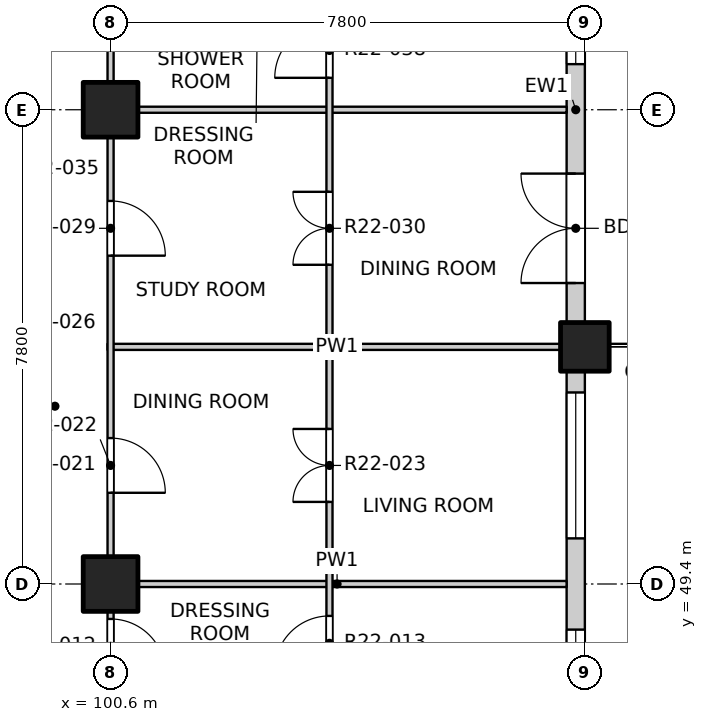
"""IFC4 building model, lengths in metres.
Left out: names, types, materials, properties, quantities, classifications, styles, units other than length and angle.
Written with IfcOpenShell. Run it as: python <this file> out.ifc"""

import sys

from ifc_helpers import new_model, si_unit, direction, frame, frame_2d, origin, origin_2d, place, context, subcontext, project, spatial, rectangle, extrude, element, fill, save


model = new_model("IFC4")
c1 = context("Model", 3, precision=1e-05, world=origin(), true_north=direction((0.0, 1.0)))
c2 = subcontext(c1, "Body", "Model", "MODEL_VIEW")
j1 = project(units=[si_unit("LENGTHUNIT", "METRE"), si_unit("PLANEANGLEUNIT", "RADIAN")], contexts=[c1])
p1 = place(None, origin())
s1 = spatial("IfcSite", under=j1, at=p1, CompositionType="ELEMENT")
p2 = place(p1, origin())
s2 = spatial("IfcBuilding", under=s1, at=p2, CompositionType="ELEMENT")
p3 = place(p2, frame((0.0, 0.0, 224.5)))
s3 = spatial("IfcBuildingStorey", under=s2, at=p3, CompositionType="ELEMENT", Elevation=224.5)
p4 = place(p3, frame((108.4, 53.3, -0.25), z_axis=(0.0, 0.0, 1.0), x_axis=(1.0, 0.0, 0.0)))
e1 = element("IfcColumn", 1, at=p4, inside=s3, PredefinedType="COLUMN", context=c2, shape_type="SweptSolid", body=[
    extrude(rectangle(XDim=0.8, YDim=0.8, at=origin_2d()), origin(), (0.0, 0.0, 1.0), 3.4),
])
for number, where, z_axis, x_axis in (
    (2, (100.6, 49.4, -0.25), (0.0, 0.0, 1.0), (1.0, 0.0, 0.0)),
    (3, (100.6, 57.2, -0.25), (0.0, 0.0, 1.0), (1.0, 0.0, 0.0)),
):
    element("IfcColumn", number, at=place(p3, frame(where, z_axis=z_axis, x_axis=x_axis)), inside=s3, PredefinedType="COLUMN", context=c2, shape_type="SweptSolid", body=[
        extrude(rectangle(XDim=0.9, YDim=0.9, at=origin_2d()), origin(), (0.0, 0.0, 1.0), 3.4),
    ])
p5 = place(p3, frame((108.25, 45.5, 0.0), z_axis=(0.0, 0.0, 1.0), x_axis=(0.0, 1.0, 0.0)))
e4 = element("IfcWall", 4, at=p5, inside=s3, PredefinedType="SOLIDWALL", context=c2, shape_type="SweptSolid", body=[
    extrude(rectangle(XDim=7.4, YDim=0.3, at=frame_2d((3.7, 0.0))), origin(), (0.0, 0.0, 1.0), 2.7),
])
p6 = place(p5, frame((0.75, 0.0, 0.9)))
e5 = element("IfcOpeningElement", 5, at=p6, cuts=e4, PredefinedType="OPENING", context=c2, shape_type="SweptSolid", body=[
    extrude(rectangle(XDim=2.4, YDim=1.8, at=frame_2d((1.2, 0.9))), frame((0.0, 0.16, 0.0), z_axis=(0.0, -1.0, 0.0), x_axis=(1.0, 0.0, 0.0)), (0.0, 0.0, 1.0), 0.32),
])
p7 = place(p5, frame((4.65, 0.0, 0.9)))
e6 = element("IfcOpeningElement", 6, at=p7, cuts=e4, PredefinedType="OPENING", context=c2, shape_type="SweptSolid", body=[
    extrude(rectangle(XDim=2.4, YDim=1.8, at=frame_2d((1.2, 0.9))), frame((0.0, 0.16, 0.0), z_axis=(0.0, -1.0, 0.0), x_axis=(1.0, 0.0, 0.0)), (0.0, 0.0, 1.0), 0.32),
])
p8 = place(p3, frame((108.25, 53.7, 0.0), z_axis=(0.0, 0.0, 1.0), x_axis=(0.0, 1.0, 0.0)))
e7 = element("IfcWall", 7, at=p8, inside=s3, PredefinedType="SOLIDWALL", context=c2, shape_type="SweptSolid", body=[
    extrude(rectangle(XDim=7.0, YDim=0.3, at=frame_2d((3.5, 0.0))), origin(), (0.0, 0.0, 1.0), 2.7),
])
p9 = place(p8, frame((0.65, 0.0, 0.0)))
e8 = element("IfcOpeningElement", 8, at=p9, cuts=e7, PredefinedType="OPENING", context=c2, shape_type="SweptSolid", body=[
    extrude(rectangle(XDim=1.8, YDim=2.4, at=frame_2d((0.9, 1.2))), frame((0.0, 0.16, 0.0), z_axis=(0.0, -1.0, 0.0), x_axis=(1.0, 0.0, 0.0)), (0.0, 0.0, 1.0), 0.32),
])
p10 = place(p8, frame((4.25, 0.0, 0.9)))
e9 = element("IfcOpeningElement", 9, at=p10, cuts=e7, PredefinedType="OPENING", context=c2, shape_type="SweptSolid", body=[
    extrude(rectangle(XDim=2.4, YDim=1.8, at=frame_2d((1.2, 0.9))), frame((0.0, 0.16, 0.0), z_axis=(0.0, -1.0, 0.0), x_axis=(1.0, 0.0, 0.0)), (0.0, 0.0, 1.0), 0.32),
])
for number, where, z_axis, x_axis in (
    (10, (100.55, 49.4, 0.0), (0.0, 0.0, 1.0), (1.0, 0.0, 0.0)),
    (11, (100.55, 53.3, 0.0), (0.0, 0.0, 1.0), (1.0, 0.0, 0.0)),
    (12, (100.55, 57.2, 0.0), (0.0, 0.0, 1.0), (1.0, 0.0, 0.0)),
):
    element("IfcWall", number, at=place(p3, frame(where, z_axis=z_axis, x_axis=x_axis)), inside=s3, PredefinedType="PARTITIONING", context=c2, shape_type="SweptSolid", body=[
        extrude(rectangle(XDim=7.55, YDim=0.1, at=frame_2d((3.775, 0.0))), origin(), (0.0, 0.0, 1.0), 3.15),
    ])
p11 = place(p3, frame((100.6, 41.9, 0.0), z_axis=(0.0, 0.0, 1.0), x_axis=(0.0, 1.0, 0.0)))
e13 = element("IfcWall", 13, at=p11, inside=s3, PredefinedType="PARTITIONING", context=c2, shape_type="SweptSolid", body=[
    extrude(rectangle(XDim=46.2, YDim=0.1, at=frame_2d((23.1, 0.0))), origin(), (0.0, 0.0, 1.0), 3.15),
])
p12 = place(p11, frame((1.2, 0.0, 0.0)))
e14 = element("IfcOpeningElement", 14, at=p12, cuts=e13, PredefinedType="OPENING", context=c2, shape_type="SweptSolid", body=[
    extrude(rectangle(XDim=0.9, YDim=2.1, at=frame_2d((0.45, 1.05))), frame((0.0, 0.06, 0.0), z_axis=(0.0, -1.0, 0.0), x_axis=(1.0, 0.0, 0.0)), (0.0, 0.0, 1.0), 0.12),
])
p13 = place(p11, frame((6.025, 0.0, 0.0)))
e15 = element("IfcOpeningElement", 15, at=p13, cuts=e13, PredefinedType="OPENING", context=c2, shape_type="SweptSolid", body=[
    extrude(rectangle(XDim=0.9, YDim=2.1, at=frame_2d((0.45, 1.05))), frame((0.0, 0.06, 0.0), z_axis=(0.0, -1.0, 0.0), x_axis=(1.0, 0.0, 0.0)), (0.0, 0.0, 1.0), 0.12),
])
p14 = place(p11, frame((9.0, 0.0, 0.0)))
e16 = element("IfcOpeningElement", 16, at=p14, cuts=e13, PredefinedType="OPENING", context=c2, shape_type="SweptSolid", body=[
    extrude(rectangle(XDim=0.9, YDim=2.1, at=frame_2d((0.45, 1.05))), frame((0.0, 0.06, 0.0), z_axis=(0.0, -1.0, 0.0), x_axis=(1.0, 0.0, 0.0)), (0.0, 0.0, 1.0), 0.12),
])
p15 = place(p11, frame((12.9, 0.0, 0.0)))
e17 = element("IfcOpeningElement", 17, at=p15, cuts=e13, PredefinedType="OPENING", context=c2, shape_type="SweptSolid", body=[
    extrude(rectangle(XDim=0.9, YDim=2.1, at=frame_2d((0.45, 1.05))), frame((0.0, 0.06, 0.0), z_axis=(0.0, -1.0, 0.0), x_axis=(1.0, 0.0, 0.0)), (0.0, 0.0, 1.0), 0.12),
])
p16 = place(p11, frame((17.775, 0.0, 0.0)))
e18 = element("IfcOpeningElement", 18, at=p16, cuts=e13, PredefinedType="OPENING", context=c2, shape_type="SweptSolid", body=[
    extrude(rectangle(XDim=0.9, YDim=2.1, at=frame_2d((0.45, 1.05))), frame((0.0, 0.06, 0.0), z_axis=(0.0, -1.0, 0.0), x_axis=(1.0, 0.0, 0.0)), (0.0, 0.0, 1.0), 0.12),
])
p17 = place(p11, frame((21.625, 0.0, 0.0)))
e19 = element("IfcOpeningElement", 19, at=p17, cuts=e13, PredefinedType="OPENING", context=c2, shape_type="SweptSolid", body=[
    extrude(rectangle(XDim=0.9, YDim=2.1, at=frame_2d((0.45, 1.05))), frame((0.0, 0.06, 0.0), z_axis=(0.0, -1.0, 0.0), x_axis=(1.0, 0.0, 0.0)), (0.0, 0.0, 1.0), 0.12),
])
p18 = place(p11, frame((25.575, 0.0, 0.0)))
e20 = element("IfcOpeningElement", 20, at=p18, cuts=e13, PredefinedType="OPENING", context=c2, shape_type="SweptSolid", body=[
    extrude(rectangle(XDim=0.9, YDim=2.1, at=frame_2d((0.45, 1.05))), frame((0.0, 0.06, 0.0), z_axis=(0.0, -1.0, 0.0), x_axis=(1.0, 0.0, 0.0)), (0.0, 0.0, 1.0), 0.12),
])
p19 = place(p11, frame((28.5, 0.0, 0.0)))
e21 = element("IfcOpeningElement", 21, at=p19, cuts=e13, PredefinedType="OPENING", context=c2, shape_type="SweptSolid", body=[
    extrude(rectangle(XDim=0.9, YDim=2.1, at=frame_2d((0.45, 1.05))), frame((0.0, 0.06, 0.0), z_axis=(0.0, -1.0, 0.0), x_axis=(1.0, 0.0, 0.0)), (0.0, 0.0, 1.0), 0.12),
])
p20 = place(p11, frame((33.375, 0.0, 0.0)))
e22 = element("IfcOpeningElement", 22, at=p20, cuts=e13, PredefinedType="OPENING", context=c2, shape_type="SweptSolid", body=[
    extrude(rectangle(XDim=0.9, YDim=2.1, at=frame_2d((0.45, 1.05))), frame((0.0, 0.06, 0.0), z_axis=(0.0, -1.0, 0.0), x_axis=(1.0, 0.0, 0.0)), (0.0, 0.0, 1.0), 0.12),
])
p21 = place(p11, frame((36.3, 0.0, 0.0)))
e23 = element("IfcOpeningElement", 23, at=p21, cuts=e13, PredefinedType="OPENING", context=c2, shape_type="SweptSolid", body=[
    extrude(rectangle(XDim=0.9, YDim=2.1, at=frame_2d((0.45, 1.05))), frame((0.0, 0.06, 0.0), z_axis=(0.0, -1.0, 0.0), x_axis=(1.0, 0.0, 0.0)), (0.0, 0.0, 1.0), 0.12),
])
p22 = place(p11, frame((40.2, 0.0, 0.0)))
e24 = element("IfcOpeningElement", 24, at=p22, cuts=e13, PredefinedType="OPENING", context=c2, shape_type="SweptSolid", body=[
    extrude(rectangle(XDim=0.9, YDim=2.1, at=frame_2d((0.45, 1.05))), frame((0.0, 0.06, 0.0), z_axis=(0.0, -1.0, 0.0), x_axis=(1.0, 0.0, 0.0)), (0.0, 0.0, 1.0), 0.12),
])
p23 = place(p11, frame((44.1, 0.0, 0.0)))
e25 = element("IfcOpeningElement", 25, at=p23, cuts=e13, PredefinedType="OPENING", context=c2, shape_type="SweptSolid", body=[
    extrude(rectangle(XDim=0.9, YDim=2.1, at=frame_2d((0.45, 1.05))), frame((0.0, 0.06, 0.0), z_axis=(0.0, -1.0, 0.0), x_axis=(1.0, 0.0, 0.0)), (0.0, 0.0, 1.0), 0.12),
])
p24 = place(p3, frame((104.2, 41.9, 0.0), z_axis=(0.0, 0.0, 1.0), x_axis=(0.0, 1.0, 0.0)))
e26 = element("IfcWall", 26, at=p24, inside=s3, PredefinedType="PARTITIONING", context=c2, shape_type="SweptSolid", body=[
    extrude(rectangle(XDim=34.7, YDim=0.1, at=frame_2d((17.35, 0.0))), origin(), (0.0, 0.0, 1.0), 3.15),
])
p25 = place(p24, frame((1.05, 0.0, 0.0)))
e27 = element("IfcOpeningElement", 27, at=p25, cuts=e26, PredefinedType="OPENING", context=c2, shape_type="SweptSolid", body=[
    extrude(rectangle(XDim=1.2, YDim=2.1, at=frame_2d((0.6, 1.05))), frame((0.0, 0.06, 0.0), z_axis=(0.0, -1.0, 0.0), x_axis=(1.0, 0.0, 0.0)), (0.0, 0.0, 1.0), 0.12),
])
p26 = place(p24, frame((4.125, 0.0, 0.0)))
e28 = element("IfcOpeningElement", 28, at=p26, cuts=e26, PredefinedType="OPENING", context=c2, shape_type="SweptSolid", body=[
    extrude(rectangle(XDim=0.9, YDim=2.1, at=frame_2d((0.45, 1.05))), frame((0.0, 0.06, 0.0), z_axis=(0.0, -1.0, 0.0), x_axis=(1.0, 0.0, 0.0)), (0.0, 0.0, 1.0), 0.12),
])
p27 = place(p24, frame((6.075, 0.0, 0.0)))
e29 = element("IfcOpeningElement", 29, at=p27, cuts=e26, PredefinedType="OPENING", context=c2, shape_type="SweptSolid", body=[
    extrude(rectangle(XDim=0.9, YDim=2.1, at=frame_2d((0.45, 1.05))), frame((0.0, 0.06, 0.0), z_axis=(0.0, -1.0, 0.0), x_axis=(1.0, 0.0, 0.0)), (0.0, 0.0, 1.0), 0.12),
])
p28 = place(p24, frame((8.85, 0.0, 0.0)))
e30 = element("IfcOpeningElement", 30, at=p28, cuts=e26, PredefinedType="OPENING", context=c2, shape_type="SweptSolid", body=[
    extrude(rectangle(XDim=1.2, YDim=2.1, at=frame_2d((0.6, 1.05))), frame((0.0, 0.06, 0.0), z_axis=(0.0, -1.0, 0.0), x_axis=(1.0, 0.0, 0.0)), (0.0, 0.0, 1.0), 0.12),
])
p29 = place(p24, frame((12.75, 0.0, 0.0)))
e31 = element("IfcOpeningElement", 31, at=p29, cuts=e26, PredefinedType="OPENING", context=c2, shape_type="SweptSolid", body=[
    extrude(rectangle(XDim=1.2, YDim=2.1, at=frame_2d((0.6, 1.05))), frame((0.0, 0.06, 0.0), z_axis=(0.0, -1.0, 0.0), x_axis=(1.0, 0.0, 0.0)), (0.0, 0.0, 1.0), 0.12),
])
p30 = place(p24, frame((15.825, 0.0, 0.0)))
e32 = element("IfcOpeningElement", 32, at=p30, cuts=e26, PredefinedType="OPENING", context=c2, shape_type="SweptSolid", body=[
    extrude(rectangle(XDim=0.9, YDim=2.1, at=frame_2d((0.45, 1.05))), frame((0.0, 0.06, 0.0), z_axis=(0.0, -1.0, 0.0), x_axis=(1.0, 0.0, 0.0)), (0.0, 0.0, 1.0), 0.12),
])
p31 = place(p24, frame((17.775, 0.0, 0.0)))
e33 = element("IfcOpeningElement", 33, at=p31, cuts=e26, PredefinedType="OPENING", context=c2, shape_type="SweptSolid", body=[
    extrude(rectangle(XDim=0.9, YDim=2.1, at=frame_2d((0.45, 1.05))), frame((0.0, 0.06, 0.0), z_axis=(0.0, -1.0, 0.0), x_axis=(1.0, 0.0, 0.0)), (0.0, 0.0, 1.0), 0.12),
])
p32 = place(p24, frame((19.725, 0.0, 0.0)))
e34 = element("IfcOpeningElement", 34, at=p32, cuts=e26, PredefinedType="OPENING", context=c2, shape_type="SweptSolid", body=[
    extrude(rectangle(XDim=0.9, YDim=2.1, at=frame_2d((0.45, 1.05))), frame((0.0, 0.06, 0.0), z_axis=(0.0, -1.0, 0.0), x_axis=(1.0, 0.0, 0.0)), (0.0, 0.0, 1.0), 0.12),
])
p33 = place(p24, frame((21.675, 0.0, 0.0)))
e35 = element("IfcOpeningElement", 35, at=p33, cuts=e26, PredefinedType="OPENING", context=c2, shape_type="SweptSolid", body=[
    extrude(rectangle(XDim=0.9, YDim=2.1, at=frame_2d((0.45, 1.05))), frame((0.0, 0.06, 0.0), z_axis=(0.0, -1.0, 0.0), x_axis=(1.0, 0.0, 0.0)), (0.0, 0.0, 1.0), 0.12),
])
p34 = place(p24, frame((23.625, 0.0, 0.0)))
e36 = element("IfcOpeningElement", 36, at=p34, cuts=e26, PredefinedType="OPENING", context=c2, shape_type="SweptSolid", body=[
    extrude(rectangle(XDim=0.9, YDim=2.1, at=frame_2d((0.45, 1.05))), frame((0.0, 0.06, 0.0), z_axis=(0.0, -1.0, 0.0), x_axis=(1.0, 0.0, 0.0)), (0.0, 0.0, 1.0), 0.12),
])
p35 = place(p24, frame((25.575, 0.0, 0.0)))
e37 = element("IfcOpeningElement", 37, at=p35, cuts=e26, PredefinedType="OPENING", context=c2, shape_type="SweptSolid", body=[
    extrude(rectangle(XDim=0.9, YDim=2.1, at=frame_2d((0.45, 1.05))), frame((0.0, 0.06, 0.0), z_axis=(0.0, -1.0, 0.0), x_axis=(1.0, 0.0, 0.0)), (0.0, 0.0, 1.0), 0.12),
])
p36 = place(p24, frame((28.35, 0.0, 0.0)))
e38 = element("IfcOpeningElement", 38, at=p36, cuts=e26, PredefinedType="OPENING", context=c2, shape_type="SweptSolid", body=[
    extrude(rectangle(XDim=1.2, YDim=2.1, at=frame_2d((0.6, 1.05))), frame((0.0, 0.06, 0.0), z_axis=(0.0, -1.0, 0.0), x_axis=(1.0, 0.0, 0.0)), (0.0, 0.0, 1.0), 0.12),
])
p37 = place(p24, frame((31.425, 0.0, 0.0)))
e39 = element("IfcOpeningElement", 39, at=p37, cuts=e26, PredefinedType="OPENING", context=c2, shape_type="SweptSolid", body=[
    extrude(rectangle(XDim=0.9, YDim=2.1, at=frame_2d((0.45, 1.05))), frame((0.0, 0.06, 0.0), z_axis=(0.0, -1.0, 0.0), x_axis=(1.0, 0.0, 0.0)), (0.0, 0.0, 1.0), 0.12),
])
p38 = place(p24, frame((33.375, 0.0, 0.0)))
e40 = element("IfcOpeningElement", 40, at=p38, cuts=e26, PredefinedType="OPENING", context=c2, shape_type="SweptSolid", body=[
    extrude(rectangle(XDim=0.9, YDim=2.1, at=frame_2d((0.45, 1.05))), frame((0.0, 0.06, 0.0), z_axis=(0.0, -1.0, 0.0), x_axis=(1.0, 0.0, 0.0)), (0.0, 0.0, 1.0), 0.12),
])
p39 = place(p6, origin())
e41 = element("IfcWindow", 41, at=p39, inside=s3, PartitioningType="DOUBLE_PANEL_VERTICAL", PredefinedType="WINDOW", context=c2, shape_type="SweptSolid", body=[
    extrude(rectangle(XDim=2.4, YDim=1.8, at=frame_2d((1.2, 0.9))), frame((0.0, 0.03, 0.0), z_axis=(0.0, -1.0, 0.0), x_axis=(1.0, 0.0, 0.0)), (0.0, 0.0, 1.0), 0.06),
])
fill(e5, e41)
p40 = place(p7, origin())
e42 = element("IfcWindow", 42, at=p40, inside=s3, PartitioningType="DOUBLE_PANEL_VERTICAL", PredefinedType="WINDOW", context=c2, shape_type="SweptSolid", body=[
    extrude(rectangle(XDim=2.4, YDim=1.8, at=frame_2d((1.2, 0.9))), frame((0.0, 0.03, 0.0), z_axis=(0.0, -1.0, 0.0), x_axis=(1.0, 0.0, 0.0)), (0.0, 0.0, 1.0), 0.06),
])
fill(e6, e42)
p41 = place(p9, origin())
e43 = element("IfcDoor", 43, at=p41, inside=s3, OperationType="DOUBLE_DOOR_SINGLE_SWING", PredefinedType="DOOR", context=c2, shape_type="SweptSolid", body=[
    extrude(rectangle(XDim=1.8, YDim=2.4, at=frame_2d((0.9, 1.2))), frame((0.0, 0.025, 0.0), z_axis=(0.0, -1.0, 0.0), x_axis=(1.0, 0.0, 0.0)), (0.0, 0.0, 1.0), 0.05),
])
fill(e8, e43)
p42 = place(p10, origin())
e44 = element("IfcWindow", 44, at=p42, inside=s3, PartitioningType="DOUBLE_PANEL_VERTICAL", PredefinedType="WINDOW", context=c2, shape_type="SweptSolid", body=[
    extrude(rectangle(XDim=2.4, YDim=1.8, at=frame_2d((1.2, 0.9))), frame((0.0, 0.03, 0.0), z_axis=(0.0, -1.0, 0.0), x_axis=(1.0, 0.0, 0.0)), (0.0, 0.0, 1.0), 0.06),
])
fill(e9, e44)
p43 = place(p13, origin())
e45 = element("IfcDoor", 45, at=p43, inside=s3, OperationType="SINGLE_SWING_RIGHT", PredefinedType="DOOR", context=c2, shape_type="SweptSolid", body=[
    extrude(rectangle(XDim=0.9, YDim=2.1, at=frame_2d((0.45, 1.05))), frame((0.0, 0.025, 0.0), z_axis=(0.0, -1.0, 0.0), x_axis=(1.0, 0.0, 0.0)), (0.0, 0.0, 1.0), 0.05),
])
fill(e15, e45)
p44 = place(p27, origin())
e46 = element("IfcDoor", 46, at=p44, inside=s3, OperationType="SINGLE_SWING_LEFT", PredefinedType="DOOR", context=c2, shape_type="SweptSolid", body=[
    extrude(rectangle(XDim=0.9, YDim=2.1, at=frame_2d((0.45, 1.05))), frame((0.0, 0.025, 0.0), z_axis=(0.0, -1.0, 0.0), x_axis=(1.0, 0.0, 0.0)), (0.0, 0.0, 1.0), 0.05),
])
fill(e29, e46)
p45 = place(p14, origin())
e47 = element("IfcDoor", 47, at=p45, inside=s3, OperationType="SINGLE_SWING_RIGHT", PredefinedType="DOOR", context=c2, shape_type="SweptSolid", body=[
    extrude(rectangle(XDim=0.9, YDim=2.1, at=frame_2d((0.45, 1.05))), frame((0.0, 0.025, 0.0), z_axis=(0.0, -1.0, 0.0), x_axis=(1.0, 0.0, 0.0)), (0.0, 0.0, 1.0), 0.05),
])
fill(e16, e47)
p46 = place(p28, origin())
e48 = element("IfcDoor", 48, at=p46, inside=s3, OperationType="DOUBLE_DOOR_SINGLE_SWING", PredefinedType="DOOR", context=c2, shape_type="SweptSolid", body=[
    extrude(rectangle(XDim=1.2, YDim=2.1, at=frame_2d((0.6, 1.05))), frame((0.0, 0.025, 0.0), z_axis=(0.0, -1.0, 0.0), x_axis=(1.0, 0.0, 0.0)), (0.0, 0.0, 1.0), 0.05),
])
fill(e30, e48)
p47 = place(p15, origin())
e49 = element("IfcDoor", 49, at=p47, inside=s3, OperationType="SINGLE_SWING_RIGHT", PredefinedType="DOOR", context=c2, shape_type="SweptSolid", body=[
    extrude(rectangle(XDim=0.9, YDim=2.1, at=frame_2d((0.45, 1.05))), frame((0.0, 0.025, 0.0), z_axis=(0.0, -1.0, 0.0), x_axis=(1.0, 0.0, 0.0)), (0.0, 0.0, 1.0), 0.05),
])
fill(e17, e49)
p48 = place(p29, origin())
e50 = element("IfcDoor", 50, at=p48, inside=s3, OperationType="DOUBLE_DOOR_SINGLE_SWING", PredefinedType="DOOR", context=c2, shape_type="SweptSolid", body=[
    extrude(rectangle(XDim=1.2, YDim=2.1, at=frame_2d((0.6, 1.05))), frame((0.0, 0.025, 0.0), z_axis=(0.0, -1.0, 0.0), x_axis=(1.0, 0.0, 0.0)), (0.0, 0.0, 1.0), 0.05),
])
fill(e31, e50)
p49 = place(p30, origin())
e51 = element("IfcDoor", 51, at=p49, inside=s3, OperationType="SINGLE_SWING_LEFT", PredefinedType="DOOR", context=c2, shape_type="SweptSolid", body=[
    extrude(rectangle(XDim=0.9, YDim=2.1, at=frame_2d((0.45, 1.05))), frame((0.0, 0.025, 0.0), z_axis=(0.0, -1.0, 0.0), x_axis=(1.0, 0.0, 0.0)), (0.0, 0.0, 1.0), 0.05),
])
fill(e32, e51)
save(model, sys.argv[1])
